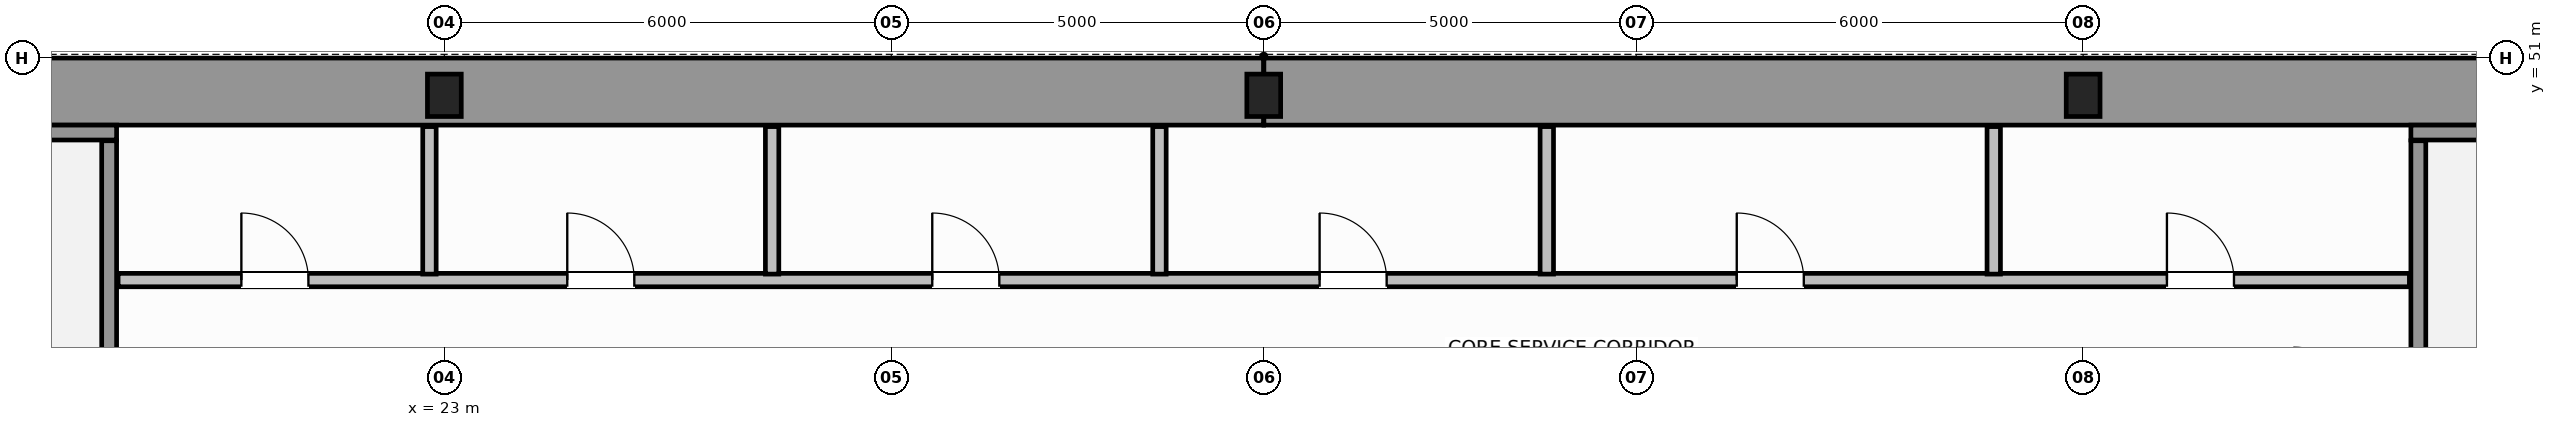
"""IFC4 building model, lengths in metres.
Left out: names, types, materials, properties, quantities, classifications, styles, units other than length and angle.
Written with IfcOpenShell. Run it as: python <this file> out.ifc"""

import sys

from ifc_helpers import new_model, si_unit, direction, frame, frame_2d, origin, origin_2d, place, context, subcontext, project, spatial, rectangle, i_section, extrude, source, transform, mapped, element, fill, save


model = new_model("IFC4")
c1 = context("Model", 3, precision=1e-05, world=origin(), true_north=direction((0.0, 1.0)))
c2 = subcontext(c1, "Body", "Model", "MODEL_VIEW")
j1 = project(units=[si_unit("LENGTHUNIT", "METRE"), si_unit("PLANEANGLEUNIT", "RADIAN")], contexts=[c1])
p1 = place(None, origin())
s1 = spatial("IfcSite", under=j1, at=p1, CompositionType="ELEMENT")
p2 = place(p1, origin())
s2 = spatial("IfcBuilding", under=s1, at=p2, CompositionType="ELEMENT")
p3 = place(p2, frame((0.0, 0.0, 64.4)))
s3 = spatial("IfcBuildingStorey", under=s2, at=p3, CompositionType="ELEMENT", Elevation=64.4)
m1 = source(origin(), c2, "Body", "SweptSolid", [
    extrude(i_section(OverallWidth=0.454, OverallDepth=0.569, WebThickness=0.078, FlangeThickness=0.08, FilletRadius=0.015, at=origin_2d()), origin(), (0.0, 0.0, 1.0), 3.8),
])
for number, where, z_axis, x_axis in (
    (1, (23.0, 50.5, 0.0), (0.0, 0.0, 1.0), (1.0, 0.0, 0.0)),
    (2, (34.0, 50.5, 0.0), (0.0, 0.0, 1.0), (1.0, 0.0, 0.0)),
    (3, (45.0, 50.5, 0.0), (0.0, 0.0, 1.0), (1.0, 0.0, 0.0)),
):
    element("IfcColumn", number, at=place(p3, frame(where, z_axis=z_axis, x_axis=x_axis)), inside=s3, PredefinedType="COLUMN", context=c2, shape_type="MappedRepresentation", body=[
        mapped(m1, transform((0.0, 0.0, 0.0), scale=1.0)),
    ])
for number, where, z_axis, x_axis in (
    (4, (14.454, 50.55, 0.0), (0.0, 0.0, 1.0), (1.0, 0.0, 0.0)),
    (5, (34.002, 50.55, 0.0), (0.0, 0.0, 1.0), (1.0, 0.0, 0.0)),
):
    element("IfcWall", number, at=place(p3, frame(where, z_axis=z_axis, x_axis=x_axis)), inside=s3, PredefinedType="SHEAR", context=c2, shape_type="SweptSolid", body=[
        extrude(rectangle(XDim=19.544, YDim=0.9, at=frame_2d((9.772, 0.0))), origin(), (0.0, 0.0, 1.0), 3.8),
    ])
p4 = place(p3, frame((14.45, 50.0, 0.0), z_axis=(0.0, 0.0, 1.0), x_axis=(1.0, 0.0, 0.0)))
e6 = element("IfcWall", 6, at=p4, inside=s3, PredefinedType="SOLIDWALL", context=c2, shape_type="SweptSolid", body=[
    extrude(rectangle(XDim=4.15, YDim=0.2, at=frame_2d((2.075, 0.0))), origin(), (0.0, 0.0, 1.0), 3.8),
])
p5 = place(p3, frame((18.5, 39.96, 0.0), z_axis=(0.0, 0.0, 1.0), x_axis=(0.0, 1.0, 0.0)))
e7 = element("IfcWall", 7, at=p5, inside=s3, PredefinedType="SOLIDWALL", context=c2, shape_type="SweptSolid", body=[
    extrude(rectangle(XDim=9.93, YDim=0.2, at=frame_2d((4.965, 0.0))), origin(), (0.0, 0.0, 1.0), 3.8),
])
p6 = place(p3, frame((49.4, 50.0, 0.0), z_axis=(0.0, 0.0, 1.0), x_axis=(1.0, 0.0, 0.0)))
e8 = element("IfcWall", 8, at=p6, inside=s3, PredefinedType="SOLIDWALL", context=c2, shape_type="SweptSolid", body=[
    extrude(rectangle(XDim=4.15, YDim=0.2, at=frame_2d((2.075, 0.0))), origin(), (0.0, 0.0, 1.0), 3.8),
])
p7 = place(p3, frame((49.5, 39.96, 0.0), z_axis=(0.0, 0.0, 1.0), x_axis=(0.0, 1.0, 0.0)))
e9 = element("IfcWall", 9, at=p7, inside=s3, PredefinedType="SOLIDWALL", context=c2, shape_type="SweptSolid", body=[
    extrude(rectangle(XDim=9.93, YDim=0.2, at=frame_2d((4.965, 0.0))), origin(), (0.0, 0.0, 1.0), 3.8),
])
p8 = place(p3, frame((18.62, 48.02, 0.0), z_axis=(0.0, 0.0, 1.0), x_axis=(1.0, 0.0, 0.0)))
e10 = element("IfcWall", 10, at=p8, inside=s3, PredefinedType="PLUMBINGWALL", context=c2, shape_type="SweptSolid", body=[
    extrude(rectangle(XDim=30.76, YDim=0.18, at=frame_2d((15.38, 0.0))), origin(), (0.0, 0.0, 1.0), 3.58),
])
p9 = place(p8, frame((1.655, 0.0, 0.0)))
e11 = element("IfcOpeningElement", 11, at=p9, cuts=e10, PredefinedType="OPENING", context=c2, shape_type="SweptSolid", body=[
    extrude(rectangle(XDim=0.9, YDim=2.15, at=frame_2d((0.45, 1.075))), frame((0.0, 0.1, 0.0), z_axis=(0.0, -1.0, 0.0), x_axis=(1.0, 0.0, 0.0)), (0.0, 0.0, 1.0), 0.2),
])
p10 = place(p8, frame((6.03, 0.0, 0.0)))
e12 = element("IfcOpeningElement", 12, at=p10, cuts=e10, PredefinedType="OPENING", context=c2, shape_type="SweptSolid", body=[
    extrude(rectangle(XDim=0.9, YDim=2.15, at=frame_2d((0.45, 1.075))), frame((0.0, 0.1, 0.0), z_axis=(0.0, -1.0, 0.0), x_axis=(1.0, 0.0, 0.0)), (0.0, 0.0, 1.0), 0.2),
])
p11 = place(p8, frame((10.93, 0.0, 0.0)))
e13 = element("IfcOpeningElement", 13, at=p11, cuts=e10, PredefinedType="OPENING", context=c2, shape_type="SweptSolid", body=[
    extrude(rectangle(XDim=0.9, YDim=2.15, at=frame_2d((0.45, 1.075))), frame((0.0, 0.1, 0.0), z_axis=(0.0, -1.0, 0.0), x_axis=(1.0, 0.0, 0.0)), (0.0, 0.0, 1.0), 0.2),
])
p12 = place(p8, frame((16.13, 0.0, 0.0)))
e14 = element("IfcOpeningElement", 14, at=p12, cuts=e10, PredefinedType="OPENING", context=c2, shape_type="SweptSolid", body=[
    extrude(rectangle(XDim=0.9, YDim=2.15, at=frame_2d((0.45, 1.075))), frame((0.0, 0.1, 0.0), z_axis=(0.0, -1.0, 0.0), x_axis=(1.0, 0.0, 0.0)), (0.0, 0.0, 1.0), 0.2),
])
p13 = place(p8, frame((21.73, 0.0, 0.0)))
e15 = element("IfcOpeningElement", 15, at=p13, cuts=e10, PredefinedType="OPENING", context=c2, shape_type="SweptSolid", body=[
    extrude(rectangle(XDim=0.9, YDim=2.15, at=frame_2d((0.45, 1.075))), frame((0.0, 0.1, 0.0), z_axis=(0.0, -1.0, 0.0), x_axis=(1.0, 0.0, 0.0)), (0.0, 0.0, 1.0), 0.2),
])
p14 = place(p8, frame((27.505, 0.0, 0.0)))
e16 = element("IfcOpeningElement", 16, at=p14, cuts=e10, PredefinedType="OPENING", context=c2, shape_type="SweptSolid", body=[
    extrude(rectangle(XDim=0.9, YDim=2.15, at=frame_2d((0.45, 1.075))), frame((0.0, 0.1, 0.0), z_axis=(0.0, -1.0, 0.0), x_axis=(1.0, 0.0, 0.0)), (0.0, 0.0, 1.0), 0.2),
])
p15 = place(p3, frame((22.8, 48.1, 0.0), z_axis=(0.0, 0.0, 1.0), x_axis=(0.0, 1.0, 0.0)))
e17 = element("IfcWall", 17, at=p15, inside=s3, PredefinedType="PLUMBINGWALL", context=c2, shape_type="SweptSolid", body=[
    extrude(rectangle(XDim=1.98, YDim=0.18, at=frame_2d((0.99, 0.0))), origin(), (0.0, 0.0, 1.0), 2.77),
])
for number, where, z_axis, x_axis in (
    (18, (27.4, 48.1, 0.0), (0.0, 0.0, 1.0), (0.0, 1.0, 0.0)),
    (19, (32.6, 48.1, 0.0), (0.0, 0.0, 1.0), (0.0, 1.0, 0.0)),
    (20, (37.8, 48.1, 0.0), (0.0, 0.0, 1.0), (0.0, 1.0, 0.0)),
    (21, (43.8, 48.1, 0.0), (0.0, 0.0, 1.0), (0.0, 1.0, 0.0)),
):
    element("IfcWall", number, at=place(p3, frame(where, z_axis=z_axis, x_axis=x_axis)), inside=s3, PredefinedType="PLUMBINGWALL", context=c2, shape_type="SweptSolid", body=[
        extrude(rectangle(XDim=1.98, YDim=0.18, at=frame_2d((0.99, 0.0))), origin(), (0.0, 0.0, 1.0), 3.58),
    ])
m2 = source(origin(), c2, "Body", "SweptSolid", [
    extrude(rectangle(XDim=0.9, YDim=2.15, at=frame_2d((0.45, 1.075))), frame((0.0, 0.025, 0.0), z_axis=(0.0, -1.0, 0.0), x_axis=(1.0, 0.0, 0.0)), (0.0, 0.0, 1.0), 0.05),
])
p16 = place(p9, origin())
e22 = element("IfcDoor", 22, at=p16, inside=s3, OperationType="SINGLE_SWING_LEFT", PredefinedType="DOOR", context=c2, shape_type="MappedRepresentation", body=[
    mapped(m2, transform((0.0, 0.0, 0.0), scale=1.0)),
])
fill(e11, e22)
p17 = place(p10, origin())
e23 = element("IfcDoor", 23, at=p17, inside=s3, OperationType="SINGLE_SWING_RIGHT", PredefinedType="DOOR", context=c2, shape_type="MappedRepresentation", body=[
    mapped(m2, transform((0.0, 0.0, 0.0), scale=1.0)),
])
fill(e12, e23)
p18 = place(p11, origin())
e24 = element("IfcDoor", 24, at=p18, inside=s3, OperationType="SINGLE_SWING_LEFT", PredefinedType="DOOR", context=c2, shape_type="MappedRepresentation", body=[
    mapped(m2, transform((0.0, 0.0, 0.0), scale=1.0)),
])
fill(e13, e24)
p19 = place(p12, origin())
e25 = element("IfcDoor", 25, at=p19, inside=s3, OperationType="SINGLE_SWING_RIGHT", PredefinedType="DOOR", context=c2, shape_type="MappedRepresentation", body=[
    mapped(m2, transform((0.0, 0.0, 0.0), scale=1.0)),
])
fill(e14, e25)
p20 = place(p13, origin())
e26 = element("IfcDoor", 26, at=p20, inside=s3, OperationType="SINGLE_SWING_LEFT", PredefinedType="DOOR", context=c2, shape_type="MappedRepresentation", body=[
    mapped(m2, transform((0.0, 0.0, 0.0), scale=1.0)),
])
fill(e15, e26)
p21 = place(p14, origin())
e27 = element("IfcDoor", 27, at=p21, inside=s3, OperationType="SINGLE_SWING_RIGHT", PredefinedType="DOOR", context=c2, shape_type="MappedRepresentation", body=[
    mapped(m2, transform((0.0, 0.0, 0.0), scale=1.0)),
])
fill(e16, e27)
save(model, sys.argv[1])
